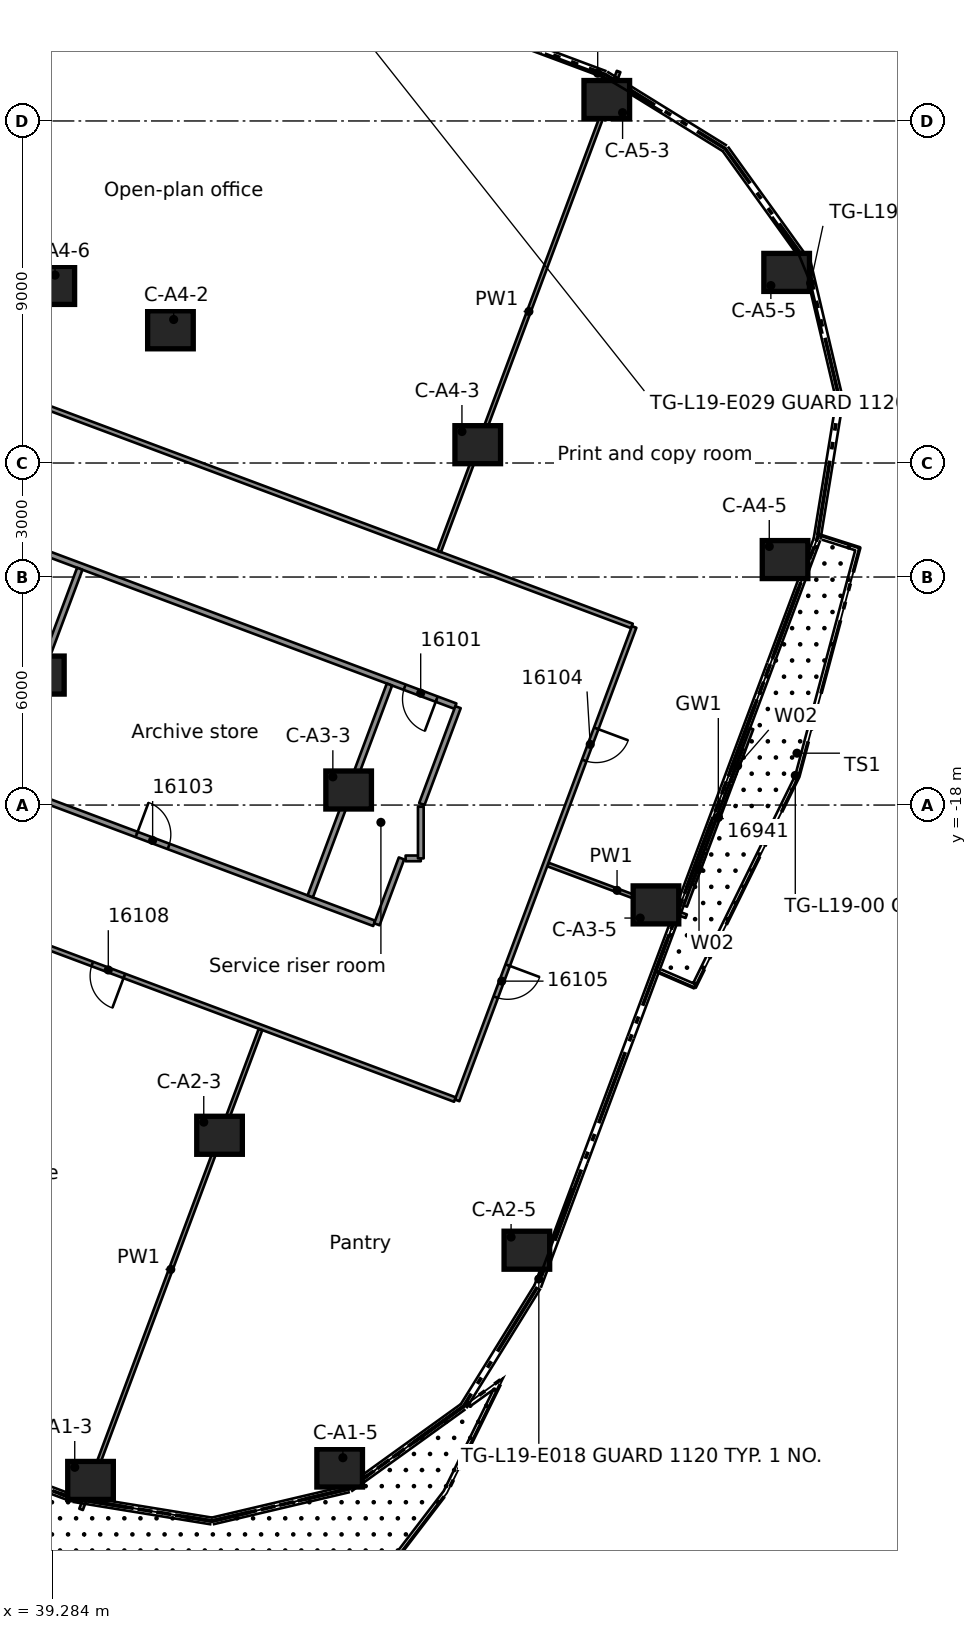
"""IFC4 building model, lengths in metres.
Left out: names, types, materials, properties, quantities, classifications, styles, units other than length and angle.
Written with IfcOpenShell. Run it as: python <this file> out.ifc"""

import sys

from ifc_helpers import new_model, si_unit, direction, frame, frame_2d, origin, origin_2d, place, context, subcontext, project, spatial, rectangle, extrude, element, fill, save


model = new_model("IFC4")
c1 = context("Model", 3, precision=1e-05, world=origin(), true_north=direction((0.0, 1.0)))
c2 = subcontext(c1, "Body", "Model", "MODEL_VIEW")
j1 = project(units=[si_unit("LENGTHUNIT", "METRE"), si_unit("PLANEANGLEUNIT", "RADIAN")], contexts=[c1])
p1 = place(None, origin())
s1 = spatial("IfcSite", under=j1, at=p1, CompositionType="ELEMENT")
p2 = place(p1, origin())
s2 = spatial("IfcBuilding", under=s1, at=p2, CompositionType="ELEMENT")
p3 = place(p2, frame((0.0, 0.0, 80.7)))
s3 = spatial("IfcBuildingStorey", under=s2, at=p3, CompositionType="ELEMENT", Elevation=80.7)
for number, where, z_axis, x_axis in (
    (1, (40.291, -35.771, 0.0), (0.0, 0.0, 1.0), (1.0, 0.0, 0.0)),
    (2, (46.847, -35.444, 0.0), (0.0, 0.0, 1.0), (1.0, 0.0, 0.0)),
    (3, (43.686, -26.689, 0.0), (0.0, 0.0, 1.0), (1.0, 0.0, 0.0)),
    (4, (51.773, -29.713, 0.0), (0.0, 0.0, 1.0), (1.0, 0.0, 0.0)),
    (5, (38.997, -14.58, 0.0), (0.0, 0.0, 1.0), (1.0, 0.0, 0.0)),
    (6, (47.083, -17.604, 0.0), (0.0, 0.0, 1.0), (1.0, 0.0, 0.0)),
    (7, (55.17, -20.627, 0.0), (0.0, 0.0, 1.0), (1.0, 0.0, 0.0)),
    (8, (42.394, -5.495, 0.0), (0.0, 0.0, 1.0), (1.0, 0.0, 0.0)),
    (9, (50.48, -8.518, 0.0), (0.0, 0.0, 1.0), (1.0, 0.0, 0.0)),
    (10, (58.567, -11.541, 0.0), (0.0, 0.0, 1.0), (1.0, 0.0, 0.0)),
    (11, (39.272, -4.327, 0.0), (0.0, 0.0, 1.0), (1.0, 0.0, 0.0)),
    (12, (53.876, 0.564, 0.0), (0.0, 0.0, 1.0), (1.0, 0.0, 0.0)),
    (13, (58.609, -3.985, 0.0), (0.0, 0.0, 1.0), (1.0, 0.0, 0.0)),
):
    element("IfcColumn", number, at=place(p3, frame(where, z_axis=z_axis, x_axis=x_axis)), inside=s3, PredefinedType="COLUMN", context=c2, shape_type="SweptSolid", body=[
        extrude(rectangle(XDim=1.2, YDim=1.0, at=origin_2d()), origin(), (0.0, 0.0, 1.0), 3.5),
    ])
p4 = place(p3, frame((57.684, -15.989, 0.0), z_axis=(0.0, 0.0, 1.0), x_axis=(-0.350205277178, -0.93667297593, 0.0)))
e14 = element("IfcWall", 14, at=p4, inside=s3, PredefinedType="STANDARD", context=c2, shape_type="SweptSolid", body=[
    extrude(rectangle(XDim=4.984, YDim=0.1, at=frame_2d((2.492, 0.0))), origin(), (0.0, 0.0, 1.0), 3.1),
])
p5 = place(p4, frame((1.592, 0.0, 0.0)))
e15 = element("IfcOpeningElement", 15, at=p5, cuts=e14, PredefinedType="OPENING", context=c2, shape_type="SweptSolid", body=[
    extrude(rectangle(XDim=1.8, YDim=2.4, at=frame_2d((0.9, 1.2))), frame((0.0, 0.06, 0.0), z_axis=(0.0, -1.0, 0.0), x_axis=(1.0, 0.0, 0.0)), (0.0, 0.0, 1.0), 0.12),
])
p6 = place(p4, frame((0.592, 0.0, 0.0)))
e16 = element("IfcOpeningElement", 16, at=p6, cuts=e14, PredefinedType="OPENING", context=c2, shape_type="SweptSolid", body=[
    extrude(rectangle(XDim=0.9, YDim=2.4, at=frame_2d((0.45, 1.2))), frame((0.0, 0.06, 0.0), z_axis=(0.0, -1.0, 0.0), x_axis=(1.0, 0.0, 0.0)), (0.0, 0.0, 1.0), 0.12),
])
p7 = place(p4, frame((3.492, 0.0, 0.0)))
e17 = element("IfcOpeningElement", 17, at=p7, cuts=e14, PredefinedType="OPENING", context=c2, shape_type="SweptSolid", body=[
    extrude(rectangle(XDim=0.9, YDim=2.4, at=frame_2d((0.45, 1.2))), frame((0.0, 0.06, 0.0), z_axis=(0.0, -1.0, 0.0), x_axis=(1.0, 0.0, 0.0)), (0.0, 0.0, 1.0), 0.12),
])
p8 = place(p3, frame((49.879, -25.749, 0.0), z_axis=(0.0, 0.0, 1.0), x_axis=(-0.936673120203, 0.350204891299, 0.0)))
e18 = element("IfcWall", 18, at=p8, inside=s3, PredefinedType="PARTITIONING", context=c2, shape_type="SweptSolid", body=[
    extrude(rectangle(XDim=24.763, YDim=0.125, at=frame_2d((12.381, 0.0))), origin(), (0.0, 0.0, 1.0), 3.08),
])
p9 = place(p8, frame((21.538, 0.0, 0.0)))
e19 = element("IfcOpeningElement", 19, at=p9, cuts=e18, PredefinedType="OPENING", context=c2, shape_type="SweptSolid", body=[
    extrude(rectangle(XDim=0.9, YDim=2.1, at=frame_2d((0.45, 1.05))), frame((0.0, 0.073, 0.0), z_axis=(0.0, -1.0, 0.0), x_axis=(1.0, 0.0, 0.0)), (0.0, 0.0, 1.0), 0.145),
])
p10 = place(p8, frame((16.238, 0.0, 0.0)))
e20 = element("IfcOpeningElement", 20, at=p10, cuts=e18, PredefinedType="OPENING", context=c2, shape_type="SweptSolid", body=[
    extrude(rectangle(XDim=0.9, YDim=2.1, at=frame_2d((0.45, 1.05))), frame((0.0, 0.073, 0.0), z_axis=(0.0, -1.0, 0.0), x_axis=(1.0, 0.0, 0.0)), (0.0, 0.0, 1.0), 0.145),
])
p11 = place(p8, frame((9.287, 0.0, 0.0)))
e21 = element("IfcOpeningElement", 21, at=p11, cuts=e18, PredefinedType="OPENING", context=c2, shape_type="SweptSolid", body=[
    extrude(rectangle(XDim=0.9, YDim=2.1, at=frame_2d((0.45, 1.05))), frame((0.0, 0.073, 0.0), z_axis=(0.0, -1.0, 0.0), x_axis=(1.0, 0.0, 0.0)), (0.0, 0.0, 1.0), 0.145),
])
p12 = place(p3, frame((27.954, -13.707, 0.0), z_axis=(0.0, 0.0, 1.0), x_axis=(0.936643936966, -0.350282936133, 0.0)))
e22 = element("IfcWall", 22, at=p12, inside=s3, PredefinedType="PARTITIONING", context=c2, shape_type="SweptSolid", body=[
    extrude(rectangle(XDim=21.14, YDim=0.15, at=frame_2d((10.57, 0.0))), origin(), (0.0, 0.0, 1.0), 3.08),
])
p13 = place(p12, frame((2.1, 0.0, 0.0)))
e23 = element("IfcOpeningElement", 23, at=p13, cuts=e22, PredefinedType="OPENING", context=c2, shape_type="SweptSolid", body=[
    extrude(rectangle(XDim=0.9, YDim=2.1, at=frame_2d((0.45, 1.05))), frame((0.0, 0.085, 0.0), z_axis=(0.0, -1.0, 0.0), x_axis=(1.0, 0.0, 0.0)), (0.0, 0.0, 1.0), 0.17),
])
p14 = place(p12, frame((14.466, 0.0, 0.0)))
e24 = element("IfcOpeningElement", 24, at=p14, cuts=e22, PredefinedType="OPENING", context=c2, shape_type="SweptSolid", body=[
    extrude(rectangle(XDim=0.9, YDim=2.1, at=frame_2d((0.45, 1.05))), frame((0.0, 0.085, 0.0), z_axis=(0.0, -1.0, 0.0), x_axis=(1.0, 0.0, 0.0)), (0.0, 0.0, 1.0), 0.17),
])
p15 = place(p3, frame((52.326, -19.564, 0.0), z_axis=(0.0, 0.0, 1.0), x_axis=(0.936664370043, -0.350228293963, 0.0)))
e25 = element("IfcWall", 25, at=p15, inside=s3, PredefinedType="PARTITIONING", context=c2, shape_type="SweptSolid", body=[
    extrude(rectangle(XDim=3.886, YDim=0.1, at=frame_2d((1.943, 0.0))), origin(), (0.0, 0.0, 1.0), 3.08),
])
p16 = place(p3, frame((49.892, -15.397, 0.0), z_axis=(0.0, 0.0, 1.0), x_axis=(-0.936700392394, 0.35013193926, 0.0)))
e26 = element("IfcWall", 26, at=p16, inside=s3, PredefinedType="PARTITIONING", context=c2, shape_type="SweptSolid", body=[
    extrude(rectangle(XDim=21.106, YDim=0.15, at=frame_2d((10.553, 0.0))), origin(), (0.0, 0.0, 1.0), 3.08),
])
p17 = place(p16, frame((12.624, 0.0, 0.0)))
e27 = element("IfcOpeningElement", 27, at=p17, cuts=e26, PredefinedType="OPENING", context=c2, shape_type="SweptSolid", body=[
    extrude(rectangle(XDim=0.9, YDim=2.1, at=frame_2d((0.45, 1.05))), frame((0.0, 0.085, 0.0), z_axis=(0.0, -1.0, 0.0), x_axis=(1.0, 0.0, 0.0)), (0.0, 0.0, 1.0), 0.17),
])
p18 = place(p16, frame((0.525, 0.0, 0.0)))
e28 = element("IfcOpeningElement", 28, at=p18, cuts=e26, PredefinedType="OPENING", context=c2, shape_type="SweptSolid", body=[
    extrude(rectangle(XDim=0.9, YDim=2.1, at=frame_2d((0.45, 1.05))), frame((0.0, 0.085, 0.0), z_axis=(0.0, -1.0, 0.0), x_axis=(1.0, 0.0, 0.0)), (0.0, 0.0, 1.0), 0.17),
])
p19 = place(p3, frame((32.706, -5.128, 0.0), z_axis=(0.0, 0.0, 1.0), x_axis=(0.936721191538, -0.350076290718, 0.0)))
e29 = element("IfcWall", 29, at=p19, inside=s3, PredefinedType="PARTITIONING", context=c2, shape_type="SweptSolid", body=[
    extrude(rectangle(XDim=23.307, YDim=0.125, at=frame_2d((11.653, 0.0))), origin(), (0.0, 0.0, 1.0), 3.08),
])
p20 = place(p3, frame((48.582, -19.403, 0.0), z_axis=(0.0, 0.0, 1.0), x_axis=(1.0, 0.0, 0.0)))
e30 = element("IfcWall", 30, at=p20, inside=s3, PredefinedType="PARTITIONING", context=c2, shape_type="SweptSolid", body=[
    extrude(rectangle(XDim=0.4, YDim=0.15, at=frame_2d((0.2, 0.0))), origin(), (0.0, 0.0, 1.0), 3.08),
])
p21 = place(p3, frame((54.596, -13.313, 0.0), z_axis=(0.0, 0.0, 1.0), x_axis=(-0.35021402566, -0.936669704982, 0.0)))
e31 = element("IfcWall", 31, at=p21, inside=s3, PredefinedType="PARTITIONING", context=c2, shape_type="SweptSolid", body=[
    extrude(rectangle(XDim=13.3, YDim=0.125, at=frame_2d((6.65, 0.0))), origin(), (0.0, 0.0, 1.0), 3.08),
])
p22 = place(p21, frame((2.85, 0.0, 0.0)))
e32 = element("IfcOpeningElement", 32, at=p22, cuts=e31, PredefinedType="OPENING", context=c2, shape_type="SweptSolid", body=[
    extrude(rectangle(XDim=0.9, YDim=2.1, at=frame_2d((0.45, 1.05))), frame((0.0, 0.073, 0.0), z_axis=(0.0, -1.0, 0.0), x_axis=(1.0, 0.0, 0.0)), (0.0, 0.0, 1.0), 0.145),
])
p23 = place(p21, frame((9.5, 0.0, 0.0)))
e33 = element("IfcOpeningElement", 33, at=p23, cuts=e31, PredefinedType="OPENING", context=c2, shape_type="SweptSolid", body=[
    extrude(rectangle(XDim=0.9, YDim=2.1, at=frame_2d((0.45, 1.05))), frame((0.0, 0.073, 0.0), z_axis=(0.0, -1.0, 0.0), x_axis=(1.0, 0.0, 0.0)), (0.0, 0.0, 1.0), 0.145),
])
p24 = place(p3, frame((47.826, -21.137, 0.0), z_axis=(0.0, 0.0, 1.0), x_axis=(0.350342430847, 0.936621685179, 0.0)))
e34 = element("IfcWall", 34, at=p24, inside=s3, PredefinedType="PARTITIONING", context=c2, shape_type="SweptSolid", body=[
    extrude(rectangle(XDim=1.85, YDim=0.15, at=frame_2d((0.925, 0.0))), origin(), (0.0, 0.0, 1.0), 3.08),
])
p25 = place(p3, frame((49.009, -17.973, 0.0), z_axis=(0.0, 0.0, 1.0), x_axis=(0.350179353698, 0.936682667846, 0.0)))
e35 = element("IfcWall", 35, at=p25, inside=s3, PredefinedType="PARTITIONING", context=c2, shape_type="SweptSolid", body=[
    extrude(rectangle(XDim=2.721, YDim=0.15, at=frame_2d((1.361, 0.0))), origin(), (0.0, 0.0, 1.0), 3.08),
])
p26 = place(p3, frame((40.042, -36.532, 0.0), z_axis=(0.0, 0.0, 1.0), x_axis=(0.350242156922, 0.936659186425, 0.0)))
e36 = element("IfcWall", 36, at=p26, inside=s3, PredefinedType="PARTITIONING", context=c2, shape_type="SweptSolid", body=[
    extrude(rectangle(XDim=13.482, YDim=0.1, at=frame_2d((6.741, 0.0))), origin(), (0.0, 0.0, 1.0), 3.08),
])
p27 = place(p3, frame((46.073, -20.402, 0.0), z_axis=(0.0, 0.0, 1.0), x_axis=(0.350255420324, 0.936654226774, 0.0)))
e37 = element("IfcWall", 37, at=p27, inside=s3, PredefinedType="PARTITIONING", context=c2, shape_type="SweptSolid", body=[
    extrude(rectangle(XDim=5.95, YDim=0.15, at=frame_2d((2.975, 0.0))), origin(), (0.0, 0.0, 1.0), 3.08),
])
p28 = place(p3, frame((49.466, -11.327, 0.0), z_axis=(0.0, 0.0, 1.0), x_axis=(0.350154846627, 0.936691829463, 0.0)))
e38 = element("IfcWall", 38, at=p28, inside=s3, PredefinedType="PARTITIONING", context=c2, shape_type="SweptSolid", body=[
    extrude(rectangle(XDim=13.482, YDim=0.1, at=frame_2d((6.741, 0.0))), origin(), (0.0, 0.0, 1.0), 3.08),
])
p29 = place(p3, frame((37.924, -17.355, 0.0), z_axis=(0.0, 0.0, 1.0), x_axis=(0.350255420324, 0.936654226774, 0.0)))
e39 = element("IfcWall", 39, at=p29, inside=s3, PredefinedType="PARTITIONING", context=c2, shape_type="SweptSolid", body=[
    extrude(rectangle(XDim=5.95, YDim=0.15, at=frame_2d((2.975, 0.0))), origin(), (0.0, 0.0, 1.0), 3.08),
])
p30 = place(p3, frame((48.982, -19.403, 0.0), z_axis=(0.0, 0.0, 1.0), x_axis=(0.0, 1.0, 0.0)))
e40 = element("IfcWall", 40, at=p30, inside=s3, PredefinedType="PARTITIONING", context=c2, shape_type="SweptSolid", body=[
    extrude(rectangle(XDim=1.359, YDim=0.15, at=frame_2d((0.68, 0.0))), origin(), (0.0, 0.0, 1.0), 3.08),
])
p31 = place(p5, origin())
e41 = element("IfcDoor", 41, at=p31, inside=s3, OperationType="DOUBLE_DOOR_SLIDING", PredefinedType="DOOR", context=c2, shape_type="SweptSolid", body=[
    extrude(rectangle(XDim=1.8, YDim=2.4, at=frame_2d((0.9, 1.2))), frame((0.0, 0.025, 0.0), z_axis=(0.0, -1.0, 0.0), x_axis=(1.0, 0.0, 0.0)), (0.0, 0.0, 1.0), 0.05),
])
fill(e15, e41)
p32 = place(p6, origin())
e42 = element("IfcWindow", 42, at=p32, inside=s3, PartitioningType="SINGLE_PANEL", PredefinedType="WINDOW", context=c2, shape_type="SweptSolid", body=[
    extrude(rectangle(XDim=0.9, YDim=2.4, at=frame_2d((0.45, 1.2))), frame((0.0, 0.03, 0.0), z_axis=(0.0, -1.0, 0.0), x_axis=(1.0, 0.0, 0.0)), (0.0, 0.0, 1.0), 0.06),
])
fill(e16, e42)
p33 = place(p7, origin())
e43 = element("IfcWindow", 43, at=p33, inside=s3, PartitioningType="SINGLE_PANEL", PredefinedType="WINDOW", context=c2, shape_type="SweptSolid", body=[
    extrude(rectangle(XDim=0.9, YDim=2.4, at=frame_2d((0.45, 1.2))), frame((0.0, 0.03, 0.0), z_axis=(0.0, -1.0, 0.0), x_axis=(1.0, 0.0, 0.0)), (0.0, 0.0, 1.0), 0.06),
])
fill(e17, e43)
p34 = place(p18, origin())
e44 = element("IfcDoor", 44, at=p34, inside=s3, OperationType="SINGLE_SWING_LEFT", PredefinedType="DOOR", context=c2, shape_type="SweptSolid", body=[
    extrude(rectangle(XDim=0.9, YDim=2.1, at=frame_2d((0.45, 1.05))), frame((0.0, 0.025, 0.0), z_axis=(0.0, -1.0, 0.0), x_axis=(1.0, 0.0, 0.0)), (0.0, 0.0, 1.0), 0.05),
])
fill(e28, e44)
p35 = place(p14, origin())
e45 = element("IfcDoor", 45, at=p35, inside=s3, OperationType="SINGLE_SWING_RIGHT", PredefinedType="DOOR", context=c2, shape_type="SweptSolid", body=[
    extrude(rectangle(XDim=0.9, YDim=2.1, at=frame_2d((0.45, 1.05))), frame((0.0, 0.025, 0.0), z_axis=(0.0, -1.0, 0.0), x_axis=(1.0, 0.0, 0.0)), (0.0, 0.0, 1.0), 0.05),
])
fill(e24, e45)
p36 = place(p22, origin())
e46 = element("IfcDoor", 46, at=p36, inside=s3, OperationType="SINGLE_SWING_LEFT", PredefinedType="DOOR", context=c2, shape_type="SweptSolid", body=[
    extrude(rectangle(XDim=0.9, YDim=2.1, at=frame_2d((0.45, 1.05))), frame((0.0, 0.025, 0.0), z_axis=(0.0, -1.0, 0.0), x_axis=(1.0, 0.0, 0.0)), (0.0, 0.0, 1.0), 0.05),
])
fill(e32, e46)
p37 = place(p23, origin())
e47 = element("IfcDoor", 47, at=p37, inside=s3, OperationType="SINGLE_SWING_RIGHT", PredefinedType="DOOR", context=c2, shape_type="SweptSolid", body=[
    extrude(rectangle(XDim=0.9, YDim=2.1, at=frame_2d((0.45, 1.05))), frame((0.0, 0.025, 0.0), z_axis=(0.0, -1.0, 0.0), x_axis=(1.0, 0.0, 0.0)), (0.0, 0.0, 1.0), 0.05),
])
fill(e33, e47)
p38 = place(p11, origin())
e48 = element("IfcDoor", 48, at=p38, inside=s3, OperationType="SINGLE_SWING_LEFT", PredefinedType="DOOR", context=c2, shape_type="SweptSolid", body=[
    extrude(rectangle(XDim=0.9, YDim=2.1, at=frame_2d((0.45, 1.05))), frame((0.0, 0.025, 0.0), z_axis=(0.0, -1.0, 0.0), x_axis=(1.0, 0.0, 0.0)), (0.0, 0.0, 1.0), 0.05),
])
fill(e21, e48)
save(model, sys.argv[1])
